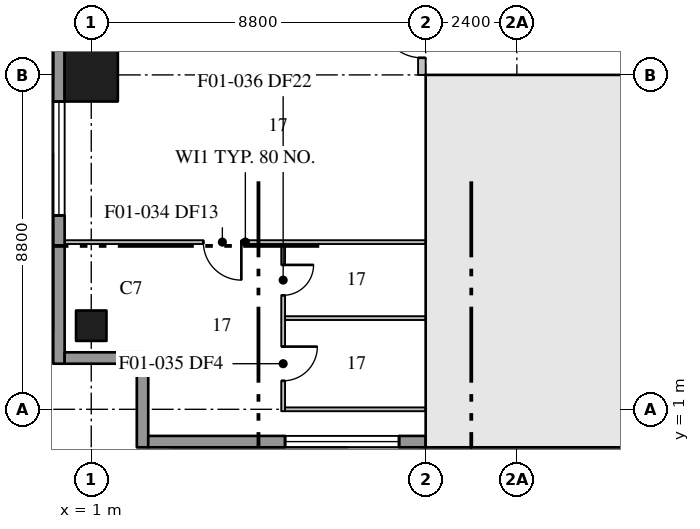
"""IFC4 building model, lengths in metres.
Left out: names, types, materials, properties, quantities, classifications, styles, units other than length and angle.
Written with IfcOpenShell. Run it as: python <this file> out.ifc"""

import sys

from ifc_helpers import new_model, si_unit, direction, frame, frame_2d, origin, origin_2d, place, context, subcontext, project, spatial, rectangle, extrude, element, fill, save


model = new_model("IFC4")
c1 = context("Model", 3, precision=1e-05, world=origin(), true_north=direction((0.0, 1.0)))
c2 = subcontext(c1, "Body", "Model", "MODEL_VIEW")
j1 = project(units=[si_unit("LENGTHUNIT", "METRE"), si_unit("PLANEANGLEUNIT", "RADIAN")], contexts=[c1])
p1 = place(None, origin())
s1 = spatial("IfcSite", under=j1, at=p1, CompositionType="ELEMENT")
p2 = place(p1, origin())
s2 = spatial("IfcBuilding", under=s1, at=p2, CompositionType="ELEMENT")
p3 = place(p2, frame((0.0, 0.0, 37.7)))
s3 = spatial("IfcBuildingStorey", under=s2, at=p3, CompositionType="ELEMENT", Elevation=37.7)
p4 = place(p3, frame((1.0, 3.2, 0.0), z_axis=(0.0, 0.0, 1.0), x_axis=(1.0, 0.0, 0.0)))
e1 = element("IfcColumn", 1, at=p4, inside=s3, PredefinedType="COLUMN", context=c2, shape_type="SweptSolid", body=[
    extrude(rectangle(XDim=0.8, YDim=0.8, at=origin_2d()), origin(), (0.0, 0.0, 1.0), 3.7),
])
p5 = place(p3, frame((1.0, 9.8, 0.0), z_axis=(0.0, 0.0, 1.0), x_axis=(1.0, 0.0, 0.0)))
e2 = element("IfcColumn", 2, at=p5, inside=s3, PredefinedType="COLUMN", context=c2, shape_type="SweptSolid", body=[
    extrude(rectangle(XDim=1.4, YDim=1.4, at=origin_2d()), origin(), (0.0, 0.0, 1.0), 3.7),
])
p6 = place(p3, frame((9.8, 0.7, 0.0), z_axis=(0.0, 0.0, 1.0), x_axis=(1.0, 0.0, 0.0)))
e3 = element("IfcWall", 3, at=p6, inside=s3, PredefinedType="SHEAR", context=c2, shape_type="SweptSolid", body=[
    extrude(rectangle(XDim=35.2, YDim=1.0, at=frame_2d((17.6, 0.0))), origin(), (0.0, 0.0, 1.0), 3.7),
])
p7 = place(p3, frame((10.5, 1.2, 0.0), z_axis=(0.0, 0.0, 1.0), x_axis=(0.0, 1.0, 0.0)))
e4 = element("IfcWall", 4, at=p7, inside=s3, PredefinedType="SHEAR", context=c2, shape_type="SweptSolid", body=[
    extrude(rectangle(XDim=8.6, YDim=1.0, at=frame_2d((4.3, 0.0))), origin(), (0.0, 0.0, 1.0), 3.7),
])
p8 = place(p3, frame((9.8, 9.6, 0.0), z_axis=(0.0, 0.0, 1.0), x_axis=(1.0, 0.0, 0.0)))
e5 = element("IfcWall", 5, at=p8, inside=s3, PredefinedType="SHEAR", context=c2, shape_type="SweptSolid", body=[
    extrude(rectangle(XDim=4.3, YDim=0.4, at=frame_2d((2.15, 0.0))), origin(), (0.0, 0.0, 1.0), 3.7),
])
p9 = place(p8, frame((2.05, 0.0, 0.0)))
e6 = element("IfcOpeningElement", 6, at=p9, cuts=e5, PredefinedType="OPENING", context=c2, shape_type="SweptSolid", body=[
    extrude(rectangle(XDim=1.2, YDim=2.1, at=frame_2d((0.6, 1.05))), frame((0.0, 0.21, 0.0), z_axis=(0.0, -1.0, 0.0), x_axis=(1.0, 0.0, 0.0)), (0.0, 0.0, 1.0), 0.42),
])
p10 = place(p3, frame((14.1, 9.6, 0.0), z_axis=(0.0, 0.0, 1.0), x_axis=(1.0, 0.0, 0.0)))
e7 = element("IfcWall", 7, at=p10, inside=s3, PredefinedType="SHEAR", context=c2, shape_type="SweptSolid", body=[
    extrude(rectangle(XDim=10.4, YDim=0.4, at=frame_2d((5.2, 0.0))), origin(), (0.0, 0.0, 1.0), 3.7),
])
p11 = place(p10, frame((0.8, 0.0, 0.0)))
e8 = element("IfcOpeningElement", 8, at=p11, cuts=e7, PredefinedType="OPENING", context=c2, shape_type="SweptSolid", body=[
    extrude(rectangle(XDim=1.0, YDim=2.1, at=frame_2d((0.5, 1.05))), frame((0.0, 0.21, 0.0), z_axis=(0.0, -1.0, 0.0), x_axis=(1.0, 0.0, 0.0)), (0.0, 0.0, 1.0), 0.42),
])
p12 = place(p10, frame((8.65, 0.0, 0.0)))
e9 = element("IfcOpeningElement", 9, at=p12, cuts=e7, PredefinedType="OPENING", context=c2, shape_type="SweptSolid", body=[
    extrude(rectangle(XDim=0.9, YDim=2.1, at=frame_2d((0.45, 1.05))), frame((0.0, 0.21, 0.0), z_axis=(0.0, -1.0, 0.0), x_axis=(1.0, 0.0, 0.0)), (0.0, 0.0, 1.0), 0.42),
])
p13 = place(p3, frame((14.1, 3.8, 0.0), z_axis=(0.0, 0.0, 1.0), x_axis=(1.0, 0.0, 0.0)))
e10 = element("IfcWall", 10, at=p13, inside=s3, PredefinedType="SHEAR", context=c2, shape_type="SweptSolid", body=[
    extrude(rectangle(XDim=26.6, YDim=0.4, at=frame_2d((13.3, 0.0))), origin(), (0.0, 0.0, 1.0), 3.7),
])
p14 = place(p13, frame((0.95, 0.0, 0.0)))
e11 = element("IfcOpeningElement", 11, at=p14, cuts=e10, PredefinedType="OPENING", context=c2, shape_type="SweptSolid", body=[
    extrude(rectangle(XDim=1.3, YDim=2.1, at=frame_2d((0.65, 1.05))), frame((0.0, 0.21, 0.0), z_axis=(0.0, -1.0, 0.0), x_axis=(1.0, 0.0, 0.0)), (0.0, 0.0, 1.0), 0.42),
])
p15 = place(p13, frame((3.95, 0.0, 0.0)))
e12 = element("IfcOpeningElement", 12, at=p15, cuts=e10, PredefinedType="OPENING", context=c2, shape_type="SweptSolid", body=[
    extrude(rectangle(XDim=1.1, YDim=2.1, at=frame_2d((0.55, 1.05))), frame((0.0, 0.21, 0.0), z_axis=(0.0, -1.0, 0.0), x_axis=(1.0, 0.0, 0.0)), (0.0, 0.0, 1.0), 0.42),
])
p16 = place(p13, frame((6.55, 0.0, 0.0)))
e13 = element("IfcOpeningElement", 13, at=p16, cuts=e10, PredefinedType="OPENING", context=c2, shape_type="SweptSolid", body=[
    extrude(rectangle(XDim=1.1, YDim=2.1, at=frame_2d((0.55, 1.05))), frame((0.0, 0.21, 0.0), z_axis=(0.0, -1.0, 0.0), x_axis=(1.0, 0.0, 0.0)), (0.0, 0.0, 1.0), 0.42),
])
p17 = place(p13, frame((9.15, 0.0, 0.0)))
e14 = element("IfcOpeningElement", 14, at=p17, cuts=e10, PredefinedType="OPENING", context=c2, shape_type="SweptSolid", body=[
    extrude(rectangle(XDim=1.1, YDim=2.1, at=frame_2d((0.55, 1.05))), frame((0.0, 0.21, 0.0), z_axis=(0.0, -1.0, 0.0), x_axis=(1.0, 0.0, 0.0)), (0.0, 0.0, 1.0), 0.42),
])
p18 = place(p13, frame((11.75, 0.0, 0.0)))
e15 = element("IfcOpeningElement", 15, at=p18, cuts=e10, PredefinedType="OPENING", context=c2, shape_type="SweptSolid", body=[
    extrude(rectangle(XDim=1.1, YDim=2.1, at=frame_2d((0.55, 1.05))), frame((0.0, 0.21, 0.0), z_axis=(0.0, -1.0, 0.0), x_axis=(1.0, 0.0, 0.0)), (0.0, 0.0, 1.0), 0.42),
])
p19 = place(p13, frame((14.35, 0.0, 0.0)))
e16 = element("IfcOpeningElement", 16, at=p19, cuts=e10, PredefinedType="OPENING", context=c2, shape_type="SweptSolid", body=[
    extrude(rectangle(XDim=1.1, YDim=2.1, at=frame_2d((0.55, 1.05))), frame((0.0, 0.21, 0.0), z_axis=(0.0, -1.0, 0.0), x_axis=(1.0, 0.0, 0.0)), (0.0, 0.0, 1.0), 0.42),
])
p20 = place(p13, frame((16.95, 0.0, 0.0)))
e17 = element("IfcOpeningElement", 17, at=p20, cuts=e10, PredefinedType="OPENING", context=c2, shape_type="SweptSolid", body=[
    extrude(rectangle(XDim=1.1, YDim=2.1, at=frame_2d((0.55, 1.05))), frame((0.0, 0.21, 0.0), z_axis=(0.0, -1.0, 0.0), x_axis=(1.0, 0.0, 0.0)), (0.0, 0.0, 1.0), 0.42),
])
p21 = place(p13, frame((19.55, 0.0, 0.0)))
e18 = element("IfcOpeningElement", 18, at=p21, cuts=e10, PredefinedType="OPENING", context=c2, shape_type="SweptSolid", body=[
    extrude(rectangle(XDim=1.1, YDim=2.1, at=frame_2d((0.55, 1.05))), frame((0.0, 0.21, 0.0), z_axis=(0.0, -1.0, 0.0), x_axis=(1.0, 0.0, 0.0)), (0.0, 0.0, 1.0), 0.42),
])
p22 = place(p3, frame((14.1, 6.8, 0.0), z_axis=(0.0, 0.0, 1.0), x_axis=(1.0, 0.0, 0.0)))
e19 = element("IfcWall", 19, at=p22, inside=s3, PredefinedType="SHEAR", context=c2, shape_type="SweptSolid", body=[
    extrude(rectangle(XDim=26.6, YDim=0.4, at=frame_2d((13.3, 0.0))), origin(), (0.0, 0.0, 1.0), 3.7),
])
p23 = place(p22, frame((10.8, 0.0, 0.0)))
e20 = element("IfcOpeningElement", 20, at=p23, cuts=e19, PredefinedType="OPENING", context=c2, shape_type="SweptSolid", body=[
    extrude(rectangle(XDim=1.8, YDim=2.1, at=frame_2d((0.9, 1.05))), frame((0.0, 0.21, 0.0), z_axis=(0.0, -1.0, 0.0), x_axis=(1.0, 0.0, 0.0)), (0.0, 0.0, 1.0), 0.42),
])
p24 = place(p22, frame((24.35, 0.0, 0.0)))
e21 = element("IfcOpeningElement", 21, at=p24, cuts=e19, PredefinedType="OPENING", context=c2, shape_type="SweptSolid", body=[
    extrude(rectangle(XDim=1.3, YDim=2.1, at=frame_2d((0.65, 1.05))), frame((0.0, 0.21, 0.0), z_axis=(0.0, -1.0, 0.0), x_axis=(1.0, 0.0, 0.0)), (0.0, 0.0, 1.0), 0.42),
])
p25 = place(p3, frame((14.1, 1.2, 0.0), z_axis=(0.0, 0.0, 1.0), x_axis=(0.0, 1.0, 0.0)))
e22 = element("IfcWall", 22, at=p25, inside=s3, PredefinedType="SHEAR", context=c2, shape_type="SweptSolid", body=[
    extrude(rectangle(XDim=8.4, YDim=0.4, at=frame_2d((4.2, 0.0))), origin(), (0.0, 0.0, 1.0), 3.7),
])
p26 = place(p25, frame((4.45, 0.0, 0.0)))
e23 = element("IfcOpeningElement", 23, at=p26, cuts=e22, PredefinedType="OPENING", context=c2, shape_type="SweptSolid", body=[
    extrude(rectangle(XDim=0.9, YDim=2.1, at=frame_2d((0.45, 1.05))), frame((0.0, 0.21, 0.0), z_axis=(0.0, -1.0, 0.0), x_axis=(1.0, 0.0, 0.0)), (0.0, 0.0, 1.0), 0.42),
])
p27 = place(p3, frame((2.35, 2.2, 0.0), z_axis=(0.0, 0.0, 1.0), x_axis=(0.0, -1.0, 0.0)))
e24 = element("IfcWall", 24, at=p27, inside=s3, PredefinedType="STANDARD", context=c2, shape_type="SweptSolid", body=[
    extrude(rectangle(XDim=2.2, YDim=0.3, at=frame_2d((1.1, 0.0))), origin(), (0.0, 0.0, 1.0), 3.4),
])
p28 = place(p3, frame((2.5, 0.15, 0.0), z_axis=(0.0, 0.0, 1.0), x_axis=(1.0, 0.0, 0.0)))
e25 = element("IfcWall", 25, at=p28, inside=s3, PredefinedType="STANDARD", context=c2, shape_type="SweptSolid", body=[
    extrude(rectangle(XDim=7.3, YDim=0.3, at=frame_2d((3.65, 0.0))), origin(), (0.0, 0.0, 1.0), 3.4),
])
p29 = place(p28, frame((3.6, 0.0, 0.75)))
e26 = element("IfcOpeningElement", 26, at=p29, cuts=e25, PredefinedType="OPENING", context=c2, shape_type="SweptSolid", body=[
    extrude(rectangle(XDim=3.0, YDim=2.3, at=frame_2d((1.5, 1.15))), frame((0.0, 0.16, 0.0), z_axis=(0.0, -1.0, 0.0), x_axis=(1.0, 0.0, 0.0)), (0.0, 0.0, 1.0), 0.32),
])
p30 = place(p3, frame((14.1, 0.1, 0.0), z_axis=(0.0, 0.0, 1.0), x_axis=(1.0, 0.0, 0.0)))
e27 = element("IfcWall", 27, at=p30, inside=s3, PredefinedType="STANDARD", context=c2, shape_type="SweptSolid", body=[
    extrude(rectangle(XDim=26.6, YDim=0.2, at=frame_2d((13.3, 0.0))), origin(), (0.0, 0.0, 1.0), 3.4),
])
p31 = place(p3, frame((0.15, 78.7, 0.0), z_axis=(0.0, 0.0, 1.0), x_axis=(0.0, -1.0, 0.0)))
e28 = element("IfcWall", 28, at=p31, inside=s3, PredefinedType="STANDARD", context=c2, shape_type="SweptSolid", body=[
    extrude(rectangle(XDim=76.5, YDim=0.3, at=frame_2d((38.25, 0.0))), origin(), (0.0, 0.0, 1.0), 3.4),
])
p32 = place(p31, frame((3.6, 0.0, 0.75)))
e29 = element("IfcOpeningElement", 29, at=p32, cuts=e28, PredefinedType="OPENING", context=c2, shape_type="SweptSolid", body=[
    extrude(rectangle(XDim=3.0, YDim=2.3, at=frame_2d((1.5, 1.15))), frame((0.0, 0.16, 0.0), z_axis=(0.0, -1.0, 0.0), x_axis=(1.0, 0.0, 0.0)), (0.0, 0.0, 1.0), 0.32),
])
p33 = place(p31, frame((8.0, 0.0, 0.75)))
e30 = element("IfcOpeningElement", 30, at=p33, cuts=e28, PredefinedType="OPENING", context=c2, shape_type="SweptSolid", body=[
    extrude(rectangle(XDim=3.0, YDim=2.3, at=frame_2d((1.5, 1.15))), frame((0.0, 0.16, 0.0), z_axis=(0.0, -1.0, 0.0), x_axis=(1.0, 0.0, 0.0)), (0.0, 0.0, 1.0), 0.32),
])
p34 = place(p31, frame((12.4, 0.0, 0.75)))
e31 = element("IfcOpeningElement", 31, at=p34, cuts=e28, PredefinedType="OPENING", context=c2, shape_type="SweptSolid", body=[
    extrude(rectangle(XDim=3.0, YDim=2.3, at=frame_2d((1.5, 1.15))), frame((0.0, 0.16, 0.0), z_axis=(0.0, -1.0, 0.0), x_axis=(1.0, 0.0, 0.0)), (0.0, 0.0, 1.0), 0.32),
])
p35 = place(p31, frame((16.8, 0.0, 0.75)))
e32 = element("IfcOpeningElement", 32, at=p35, cuts=e28, PredefinedType="OPENING", context=c2, shape_type="SweptSolid", body=[
    extrude(rectangle(XDim=3.0, YDim=2.3, at=frame_2d((1.5, 1.15))), frame((0.0, 0.16, 0.0), z_axis=(0.0, -1.0, 0.0), x_axis=(1.0, 0.0, 0.0)), (0.0, 0.0, 1.0), 0.32),
])
p36 = place(p31, frame((21.2, 0.0, 0.75)))
e33 = element("IfcOpeningElement", 33, at=p36, cuts=e28, PredefinedType="OPENING", context=c2, shape_type="SweptSolid", body=[
    extrude(rectangle(XDim=3.0, YDim=2.3, at=frame_2d((1.5, 1.15))), frame((0.0, 0.16, 0.0), z_axis=(0.0, -1.0, 0.0), x_axis=(1.0, 0.0, 0.0)), (0.0, 0.0, 1.0), 0.32),
])
p37 = place(p31, frame((25.6, 0.0, 0.75)))
e34 = element("IfcOpeningElement", 34, at=p37, cuts=e28, PredefinedType="OPENING", context=c2, shape_type="SweptSolid", body=[
    extrude(rectangle(XDim=3.0, YDim=2.3, at=frame_2d((1.5, 1.15))), frame((0.0, 0.16, 0.0), z_axis=(0.0, -1.0, 0.0), x_axis=(1.0, 0.0, 0.0)), (0.0, 0.0, 1.0), 0.32),
])
p38 = place(p31, frame((30.0, 0.0, 0.75)))
e35 = element("IfcOpeningElement", 35, at=p38, cuts=e28, PredefinedType="OPENING", context=c2, shape_type="SweptSolid", body=[
    extrude(rectangle(XDim=3.0, YDim=2.3, at=frame_2d((1.5, 1.15))), frame((0.0, 0.16, 0.0), z_axis=(0.0, -1.0, 0.0), x_axis=(1.0, 0.0, 0.0)), (0.0, 0.0, 1.0), 0.32),
])
p39 = place(p31, frame((34.4, 0.0, 0.75)))
e36 = element("IfcOpeningElement", 36, at=p39, cuts=e28, PredefinedType="OPENING", context=c2, shape_type="SweptSolid", body=[
    extrude(rectangle(XDim=3.0, YDim=2.3, at=frame_2d((1.5, 1.15))), frame((0.0, 0.16, 0.0), z_axis=(0.0, -1.0, 0.0), x_axis=(1.0, 0.0, 0.0)), (0.0, 0.0, 1.0), 0.32),
])
p40 = place(p31, frame((38.8, 0.0, 0.75)))
e37 = element("IfcOpeningElement", 37, at=p40, cuts=e28, PredefinedType="OPENING", context=c2, shape_type="SweptSolid", body=[
    extrude(rectangle(XDim=3.0, YDim=2.3, at=frame_2d((1.5, 1.15))), frame((0.0, 0.16, 0.0), z_axis=(0.0, -1.0, 0.0), x_axis=(1.0, 0.0, 0.0)), (0.0, 0.0, 1.0), 0.32),
])
p41 = place(p31, frame((43.2, 0.0, 0.75)))
e38 = element("IfcOpeningElement", 38, at=p41, cuts=e28, PredefinedType="OPENING", context=c2, shape_type="SweptSolid", body=[
    extrude(rectangle(XDim=3.0, YDim=2.3, at=frame_2d((1.5, 1.15))), frame((0.0, 0.16, 0.0), z_axis=(0.0, -1.0, 0.0), x_axis=(1.0, 0.0, 0.0)), (0.0, 0.0, 1.0), 0.32),
])
p42 = place(p31, frame((47.6, 0.0, 0.75)))
e39 = element("IfcOpeningElement", 39, at=p42, cuts=e28, PredefinedType="OPENING", context=c2, shape_type="SweptSolid", body=[
    extrude(rectangle(XDim=3.0, YDim=2.3, at=frame_2d((1.5, 1.15))), frame((0.0, 0.16, 0.0), z_axis=(0.0, -1.0, 0.0), x_axis=(1.0, 0.0, 0.0)), (0.0, 0.0, 1.0), 0.32),
])
p43 = place(p31, frame((52.0, 0.0, 0.75)))
e40 = element("IfcOpeningElement", 40, at=p43, cuts=e28, PredefinedType="OPENING", context=c2, shape_type="SweptSolid", body=[
    extrude(rectangle(XDim=3.0, YDim=2.3, at=frame_2d((1.5, 1.15))), frame((0.0, 0.16, 0.0), z_axis=(0.0, -1.0, 0.0), x_axis=(1.0, 0.0, 0.0)), (0.0, 0.0, 1.0), 0.32),
])
p44 = place(p31, frame((56.4, 0.0, 0.75)))
e41 = element("IfcOpeningElement", 41, at=p44, cuts=e28, PredefinedType="OPENING", context=c2, shape_type="SweptSolid", body=[
    extrude(rectangle(XDim=3.0, YDim=2.3, at=frame_2d((1.5, 1.15))), frame((0.0, 0.16, 0.0), z_axis=(0.0, -1.0, 0.0), x_axis=(1.0, 0.0, 0.0)), (0.0, 0.0, 1.0), 0.32),
])
p45 = place(p31, frame((60.8, 0.0, 0.75)))
e42 = element("IfcOpeningElement", 42, at=p45, cuts=e28, PredefinedType="OPENING", context=c2, shape_type="SweptSolid", body=[
    extrude(rectangle(XDim=3.0, YDim=2.3, at=frame_2d((1.5, 1.15))), frame((0.0, 0.16, 0.0), z_axis=(0.0, -1.0, 0.0), x_axis=(1.0, 0.0, 0.0)), (0.0, 0.0, 1.0), 0.32),
])
p46 = place(p31, frame((65.2, 0.0, 0.75)))
e43 = element("IfcOpeningElement", 43, at=p46, cuts=e28, PredefinedType="OPENING", context=c2, shape_type="SweptSolid", body=[
    extrude(rectangle(XDim=3.0, YDim=2.3, at=frame_2d((1.5, 1.15))), frame((0.0, 0.16, 0.0), z_axis=(0.0, -1.0, 0.0), x_axis=(1.0, 0.0, 0.0)), (0.0, 0.0, 1.0), 0.32),
])
p47 = place(p31, frame((69.6, 0.0, 0.75)))
e44 = element("IfcOpeningElement", 44, at=p47, cuts=e28, PredefinedType="OPENING", context=c2, shape_type="SweptSolid", body=[
    extrude(rectangle(XDim=3.0, YDim=2.3, at=frame_2d((1.5, 1.15))), frame((0.0, 0.16, 0.0), z_axis=(0.0, -1.0, 0.0), x_axis=(1.0, 0.0, 0.0)), (0.0, 0.0, 1.0), 0.32),
])
p48 = place(p3, frame((0.3, 2.35, 0.0), z_axis=(0.0, 0.0, 1.0), x_axis=(1.0, 0.0, 0.0)))
e45 = element("IfcWall", 45, at=p48, inside=s3, PredefinedType="STANDARD", context=c2, shape_type="SweptSolid", body=[
    extrude(rectangle(XDim=2.2, YDim=0.3, at=frame_2d((1.1, 0.0))), origin(), (0.0, 0.0, 1.0), 3.4),
])
p49 = place(p3, frame((9.7, 9.8, 0.0), z_axis=(0.0, 0.0, 1.0), x_axis=(0.0, 1.0, 0.0)))
e46 = element("IfcWall", 46, at=p49, inside=s3, PredefinedType="PARTITIONING", context=c2, shape_type="SweptSolid", body=[
    extrude(rectangle(XDim=1.6, YDim=0.2, at=frame_2d((0.8, 0.0))), origin(), (0.0, 0.0, 1.0), 3.4),
])
p50 = place(p49, frame((0.45, 0.0, 0.0)))
e47 = element("IfcOpeningElement", 47, at=p50, cuts=e46, PredefinedType="OPENING", context=c2, shape_type="SweptSolid", body=[
    extrude(rectangle(XDim=1.1, YDim=2.1, at=frame_2d((0.55, 1.05))), frame((0.0, 0.11, 0.0), z_axis=(0.0, -1.0, 0.0), x_axis=(1.0, 0.0, 0.0)), (0.0, 0.0, 1.0), 0.22),
])
p51 = place(p3, frame((6.05, 5.35, 0.0), z_axis=(0.0, 0.0, 1.0), x_axis=(0.0, -1.0, 0.0)))
e48 = element("IfcWall", 48, at=p51, inside=s3, PredefinedType="PARTITIONING", context=c2, shape_type="SweptSolid", body=[
    extrude(rectangle(XDim=4.4, YDim=0.1, at=frame_2d((2.2, 0.0))), origin(), (0.0, 0.0, 1.0), 3.4),
])
p52 = place(p51, frame((2.7, 0.0, 0.0)))
e49 = element("IfcOpeningElement", 49, at=p52, cuts=e48, PredefinedType="OPENING", context=c2, shape_type="SweptSolid", body=[
    extrude(rectangle(XDim=0.9, YDim=2.1, at=frame_2d((0.45, 1.05))), frame((0.0, 0.06, 0.0), z_axis=(0.0, -1.0, 0.0), x_axis=(1.0, 0.0, 0.0)), (0.0, 0.0, 1.0), 0.12),
])
p53 = place(p51, frame((0.55, 0.0, 0.0)))
e50 = element("IfcOpeningElement", 50, at=p53, cuts=e48, PredefinedType="OPENING", context=c2, shape_type="SweptSolid", body=[
    extrude(rectangle(XDim=0.8, YDim=2.1, at=frame_2d((0.4, 1.05))), frame((0.0, 0.06, 0.0), z_axis=(0.0, -1.0, 0.0), x_axis=(1.0, 0.0, 0.0)), (0.0, 0.0, 1.0), 0.12),
])
p54 = place(p3, frame((9.8, 5.4, 0.0), z_axis=(0.0, 0.0, 1.0), x_axis=(-1.0, 0.0, 0.0)))
e51 = element("IfcWall", 51, at=p54, inside=s3, PredefinedType="PARTITIONING", context=c2, shape_type="SweptSolid", body=[
    extrude(rectangle(XDim=9.49, YDim=0.1, at=frame_2d((4.745, 0.0))), origin(), (0.0, 0.0, 1.0), 3.4),
])
p55 = place(p54, frame((4.85, 0.0, 0.0)))
e52 = element("IfcOpeningElement", 52, at=p55, cuts=e51, PredefinedType="OPENING", context=c2, shape_type="SweptSolid", body=[
    extrude(rectangle(XDim=1.0, YDim=2.1, at=frame_2d((0.5, 1.05))), frame((0.0, 0.06, 0.0), z_axis=(0.0, -1.0, 0.0), x_axis=(1.0, 0.0, 0.0)), (0.0, 0.0, 1.0), 0.12),
])
for number, where, z_axis, x_axis in (
    (53, (6.1, 1.0, 0.0), (0.0, 0.0, 1.0), (1.0, 0.0, 0.0)),
    (54, (6.1, 3.4, 0.0), (0.0, 0.0, 1.0), (1.0, 0.0, 0.0)),
):
    element("IfcWall", number, at=place(p3, frame(where, z_axis=z_axis, x_axis=x_axis)), inside=s3, PredefinedType="PARTITIONING", context=c2, shape_type="SweptSolid", body=[
        extrude(rectangle(XDim=3.7, YDim=0.1, at=frame_2d((1.85, 0.0))), origin(), (0.0, 0.0, 1.0), 3.4),
    ])
p56 = place(p29, origin())
e55 = element("IfcWindow", 55, at=p56, inside=s3, PartitioningType="SINGLE_PANEL", PredefinedType="WINDOW", context=c2, shape_type="SweptSolid", body=[
    extrude(rectangle(XDim=3.0, YDim=2.3, at=frame_2d((1.5, 1.15))), frame((0.0, 0.03, 0.0), z_axis=(0.0, -1.0, 0.0), x_axis=(1.0, 0.0, 0.0)), (0.0, 0.0, 1.0), 0.06),
])
fill(e26, e55)
p57 = place(p47, origin())
e56 = element("IfcWindow", 56, at=p57, inside=s3, PartitioningType="SINGLE_PANEL", PredefinedType="WINDOW", context=c2, shape_type="SweptSolid", body=[
    extrude(rectangle(XDim=3.0, YDim=2.3, at=frame_2d((1.5, 1.15))), frame((0.0, 0.03, 0.0), z_axis=(0.0, -1.0, 0.0), x_axis=(1.0, 0.0, 0.0)), (0.0, 0.0, 1.0), 0.06),
])
fill(e44, e56)
p58 = place(p9, frame((1.2, 0.0, 0.0), z_axis=(0.0, 0.0, 1.0), x_axis=(-1.0, 0.0, 0.0)))
e57 = element("IfcDoor", 57, at=p58, inside=s3, OperationType="SINGLE_SWING_LEFT", PredefinedType="DOOR", context=c2, shape_type="SweptSolid", body=[
    extrude(rectangle(XDim=1.2, YDim=2.1, at=frame_2d((0.6, 1.05))), frame((0.0, 0.025, 0.0), z_axis=(0.0, -1.0, 0.0), x_axis=(1.0, 0.0, 0.0)), (0.0, 0.0, 1.0), 0.05),
])
fill(e6, e57)
p59 = place(p26, origin())
e58 = element("IfcDoor", 58, at=p59, inside=s3, OperationType="SINGLE_SWING_RIGHT", PredefinedType="DOOR", context=c2, shape_type="SweptSolid", body=[
    extrude(rectangle(XDim=0.9, YDim=2.1, at=frame_2d((0.45, 1.05))), frame((0.0, 0.025, 0.0), z_axis=(0.0, -1.0, 0.0), x_axis=(1.0, 0.0, 0.0)), (0.0, 0.0, 1.0), 0.05),
])
fill(e23, e58)
p60 = place(p50, origin())
e59 = element("IfcDoor", 59, at=p60, inside=s3, OperationType="SINGLE_SWING_RIGHT", PredefinedType="DOOR", context=c2, shape_type="SweptSolid", body=[
    extrude(rectangle(XDim=1.1, YDim=2.1, at=frame_2d((0.55, 1.05))), frame((0.0, 0.025, 0.0), z_axis=(0.0, -1.0, 0.0), x_axis=(1.0, 0.0, 0.0)), (0.0, 0.0, 1.0), 0.05),
])
fill(e47, e59)
p61 = place(p55, origin())
e60 = element("IfcDoor", 60, at=p61, inside=s3, OperationType="SINGLE_SWING_LEFT", PredefinedType="DOOR", context=c2, shape_type="SweptSolid", body=[
    extrude(rectangle(XDim=1.0, YDim=2.1, at=frame_2d((0.5, 1.05))), frame((0.0, 0.025, 0.0), z_axis=(0.0, -1.0, 0.0), x_axis=(1.0, 0.0, 0.0)), (0.0, 0.0, 1.0), 0.05),
])
fill(e52, e60)
p62 = place(p52, origin())
e61 = element("IfcDoor", 61, at=p62, inside=s3, OperationType="SINGLE_SWING_LEFT", PredefinedType="DOOR", context=c2, shape_type="SweptSolid", body=[
    extrude(rectangle(XDim=0.9, YDim=2.1, at=frame_2d((0.45, 1.05))), frame((0.0, 0.025, 0.0), z_axis=(0.0, -1.0, 0.0), x_axis=(1.0, 0.0, 0.0)), (0.0, 0.0, 1.0), 0.05),
])
fill(e49, e61)
p63 = place(p53, origin())
e62 = element("IfcDoor", 62, at=p63, inside=s3, OperationType="SINGLE_SWING_LEFT", PredefinedType="DOOR", context=c2, shape_type="SweptSolid", body=[
    extrude(rectangle(XDim=0.8, YDim=2.1, at=frame_2d((0.4, 1.05))), frame((0.0, 0.025, 0.0), z_axis=(0.0, -1.0, 0.0), x_axis=(1.0, 0.0, 0.0)), (0.0, 0.0, 1.0), 0.05),
])
fill(e50, e62)
save(model, sys.argv[1])
